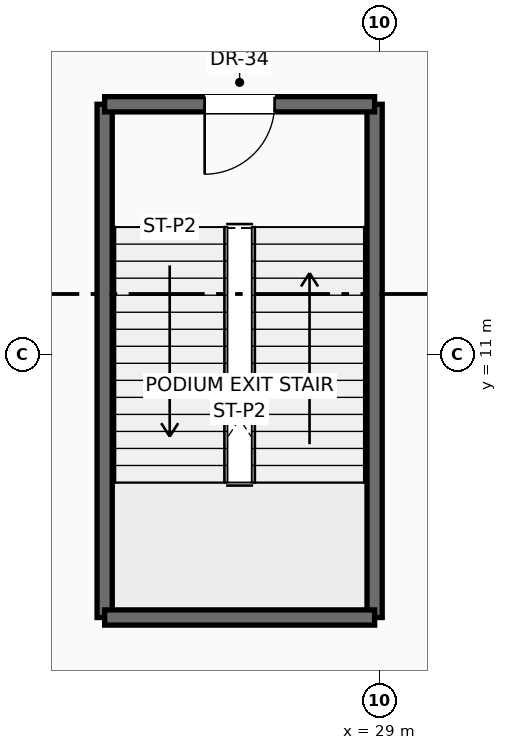
"""IFC4 building model, lengths in metres.
Left out: names, types, materials, properties, quantities, classifications, styles, units other than length and angle.
Written with IfcOpenShell. Run it as: python <this file> out.ifc"""

import sys

from ifc_helpers import new_model, si_unit, direction, frame, frame_2d, origin, place, context, subcontext, project, spatial, rectangle, extrude, source, transform, mapped, element, fill, save


model = new_model("IFC4")
c1 = context("Model", 3, precision=1e-05, world=origin(), true_north=direction((0.0, 1.0)))
c2 = subcontext(c1, "Body", "Model", "MODEL_VIEW")
j1 = project(units=[si_unit("LENGTHUNIT", "METRE"), si_unit("PLANEANGLEUNIT", "RADIAN")], contexts=[c1])
p1 = place(None, origin())
s1 = spatial("IfcSite", under=j1, at=p1, CompositionType="ELEMENT")
p2 = place(p1, origin())
s2 = spatial("IfcBuilding", under=s1, at=p2, CompositionType="ELEMENT")
p3 = place(p2, frame((0.0, 0.0, 5.5)))
s3 = spatial("IfcBuildingStorey", under=s2, at=p3, CompositionType="ELEMENT", Elevation=5.5)
for number, where, z_axis, x_axis in (
    (1, (24.48, 6.68, 0.0), (0.0, 0.0, 1.0), (0.0, 1.0, 0.0)),
    (2, (28.92, 6.68, 0.0), (0.0, 0.0, 1.0), (0.0, 1.0, 0.0)),
):
    element("IfcWall", number, at=place(p3, frame(where, z_axis=z_axis, x_axis=x_axis)), inside=s3, PredefinedType="SOLIDWALL", context=c2, shape_type="SweptSolid", body=[
        extrude(rectangle(XDim=8.44, YDim=0.25, at=frame_2d((4.22, 0.0))), origin(), (0.0, 0.0, 1.0), 5.17),
    ])
p4 = place(p3, frame((24.48, 6.68, 0.0), z_axis=(0.0, 0.0, 1.0), x_axis=(1.0, 0.0, 0.0)))
e3 = element("IfcWall", 3, at=p4, inside=s3, PredefinedType="SOLIDWALL", context=c2, shape_type="SweptSolid", body=[
    extrude(rectangle(XDim=4.44, YDim=0.25, at=frame_2d((2.22, 0.0))), origin(), (0.0, 0.0, 1.0), 5.17),
])
p5 = place(p3, frame((28.92, 15.12, 0.0), z_axis=(0.0, 0.0, 1.0), x_axis=(-1.0, 0.0, 0.0)))
e4 = element("IfcWall", 4, at=p5, inside=s3, PredefinedType="SOLIDWALL", context=c2, shape_type="SweptSolid", body=[
    extrude(rectangle(XDim=4.44, YDim=0.25, at=frame_2d((2.22, 0.0))), origin(), (0.0, 0.0, 1.0), 5.17),
])
p6 = place(p5, frame((1.645, 0.0, 0.0)))
e5 = element("IfcOpeningElement", 5, at=p6, cuts=e4, PredefinedType="OPENING", context=c2, shape_type="SweptSolid", body=[
    extrude(rectangle(XDim=1.15, YDim=2.2, at=frame_2d((0.575, 1.1))), frame((0.0, 0.135, 0.0), z_axis=(0.0, -1.0, 0.0), x_axis=(1.0, 0.0, 0.0)), (0.0, 0.0, 1.0), 0.27),
])
m1 = source(origin(), c2, "Body", "SweptSolid", [
    extrude(rectangle(XDim=1.15, YDim=2.2, at=frame_2d((0.575, 1.1))), frame((0.0, 0.025, 0.0), z_axis=(0.0, -1.0, 0.0), x_axis=(1.0, 0.0, 0.0)), (0.0, 0.0, 1.0), 0.05),
])
p7 = place(p6, origin())
e6 = element("IfcDoor", 6, at=p7, inside=s3, OperationType="SINGLE_SWING_RIGHT", PredefinedType="DOOR", context=c2, shape_type="MappedRepresentation", body=[
    mapped(m1, transform((0.0, 0.0, 0.0), scale=1.0)),
])
fill(e5, e6)
save(model, sys.argv[1])
